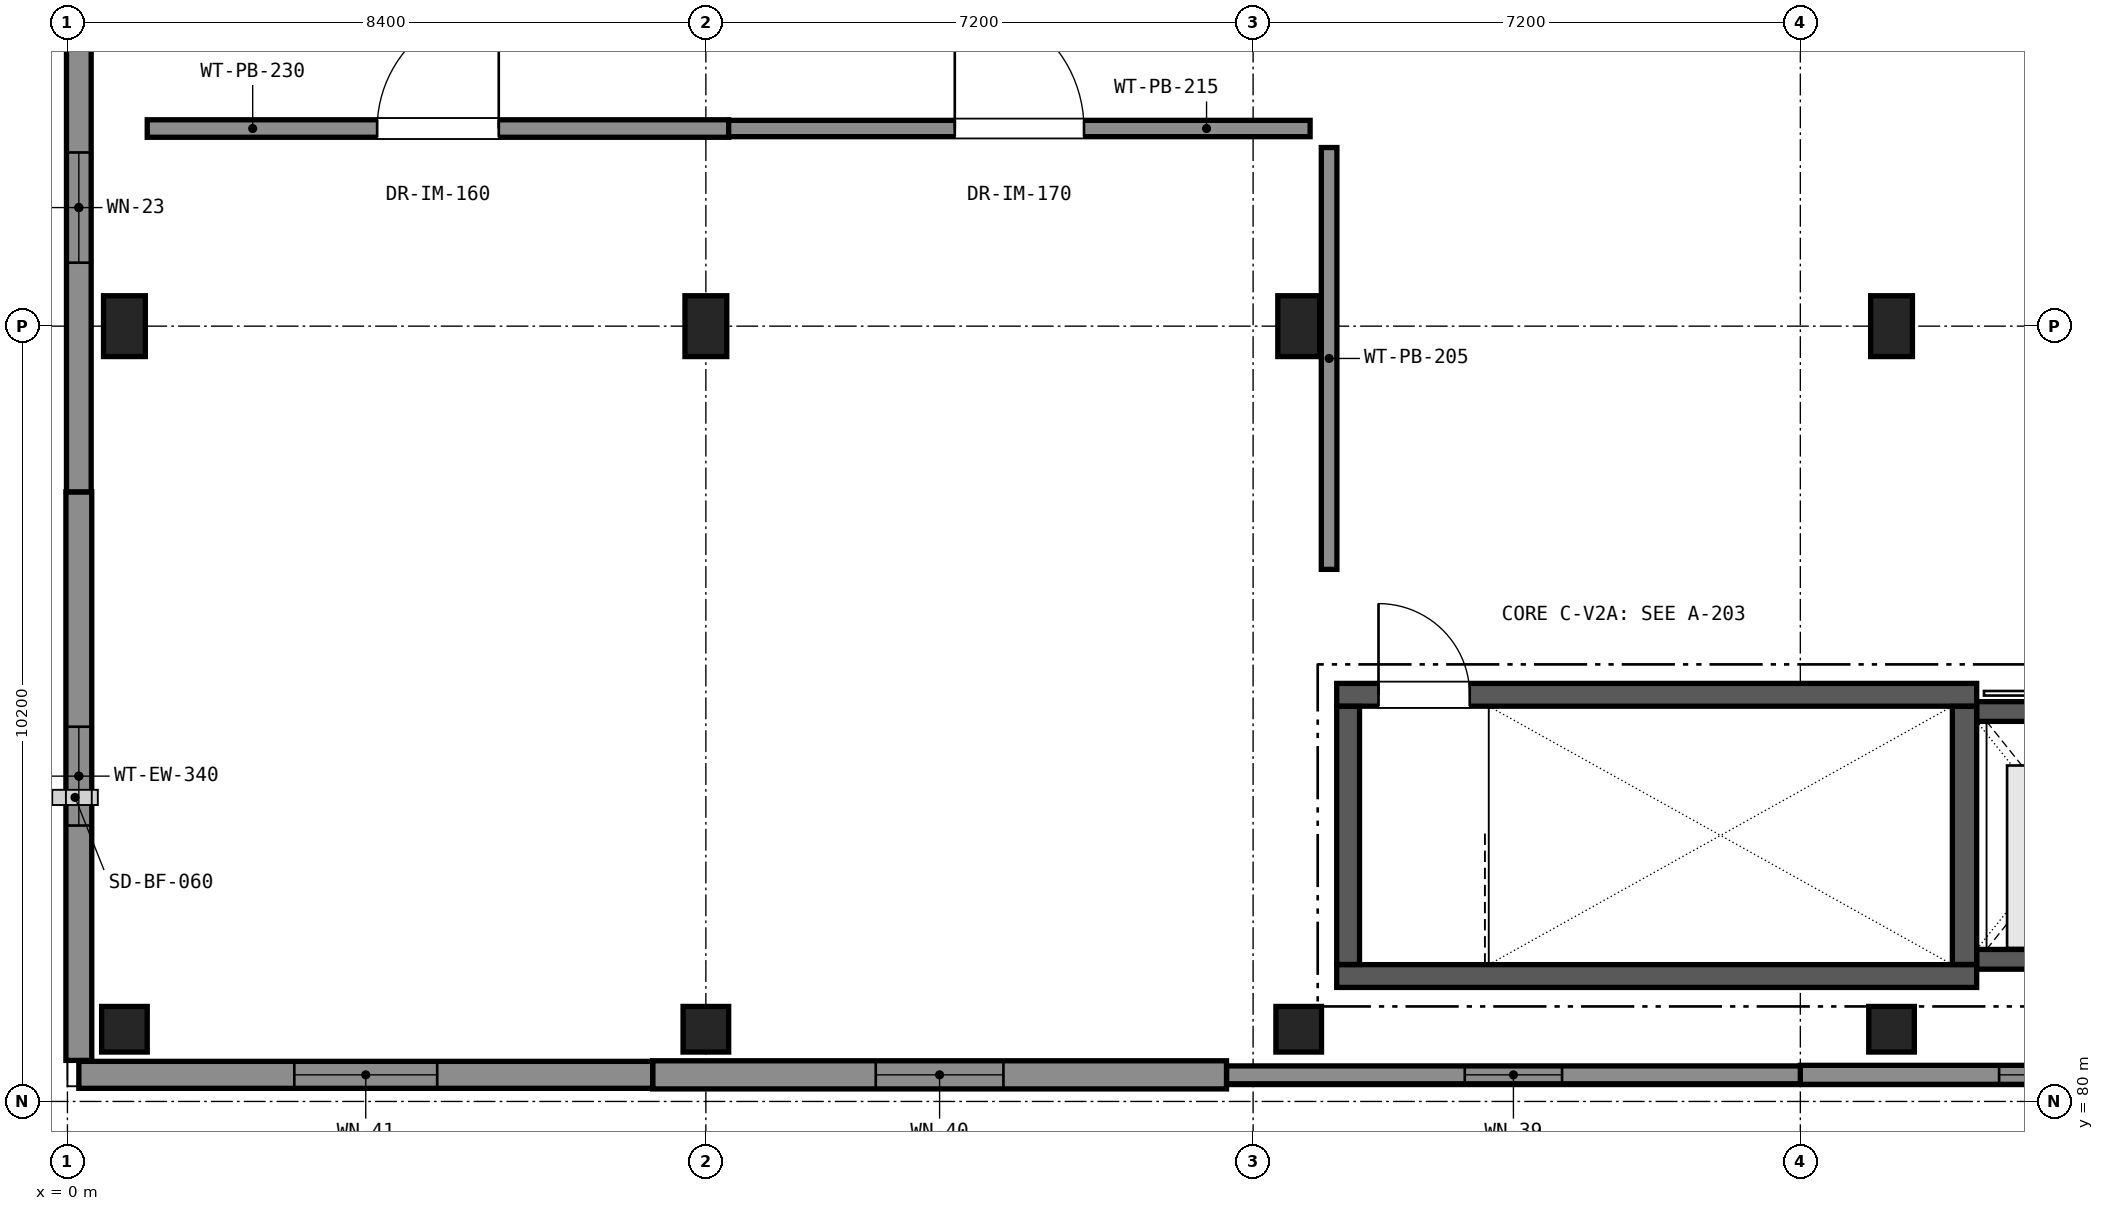
"""IFC4 building model, lengths in metres.
Left out: names, types, materials, properties, quantities, classifications, styles, units other than length and angle.
Written with IfcOpenShell. Run it as: python <this file> out.ifc"""

import sys

from ifc_helpers import new_model, si_unit, direction, frame, frame_2d, origin, origin_2d, place, context, subcontext, project, spatial, rectangle, extrude, element, fill, save


model = new_model("IFC4")
c1 = context("Model", 3, precision=1e-05, world=origin(), true_north=direction((0.0, 1.0)))
c2 = subcontext(c1, "Body", "Model", "MODEL_VIEW")
j1 = project(units=[si_unit("LENGTHUNIT", "METRE"), si_unit("PLANEANGLEUNIT", "RADIAN")], contexts=[c1])
p1 = place(None, origin())
s1 = spatial("IfcSite", under=j1, at=p1, CompositionType="ELEMENT")
p2 = place(p1, origin())
s2 = spatial("IfcBuilding", under=s1, at=p2, CompositionType="ELEMENT")
p3 = place(p2, frame((0.0, 0.0, 9.52)))
s3 = spatial("IfcBuildingStorey", under=s2, at=p3, CompositionType="ELEMENT", Elevation=9.52)
p4 = place(p3, frame((0.75, 80.95, 0.0), z_axis=(0.0, 0.0, 1.0), x_axis=(1.0, 0.0, 0.0)))
e1 = element("IfcColumn", 1, at=p4, inside=s3, PredefinedType="COLUMN", context=c2, shape_type="SweptSolid", body=[
    extrude(rectangle(XDim=0.6, YDim=0.6, at=origin_2d()), origin(), (0.0, 0.0, 1.0), 4.08),
])
p5 = place(p3, frame((0.75, 90.2, 0.0), z_axis=(0.0, 0.0, 1.0), x_axis=(1.0, 0.0, 0.0)))
e2 = element("IfcColumn", 2, at=p5, inside=s3, PredefinedType="COLUMN", context=c2, shape_type="SweptSolid", body=[
    extrude(rectangle(XDim=0.55, YDim=0.8, at=origin_2d()), origin(), (0.0, 0.0, 1.0), 4.08),
])
p6 = place(p3, frame((8.4, 80.95, 0.0), z_axis=(0.0, 0.0, 1.0), x_axis=(1.0, 0.0, 0.0)))
e3 = element("IfcColumn", 3, at=p6, inside=s3, PredefinedType="COLUMN", context=c2, shape_type="SweptSolid", body=[
    extrude(rectangle(XDim=0.6, YDim=0.6, at=origin_2d()), origin(), (0.0, 0.0, 1.0), 4.08),
])
p7 = place(p3, frame((8.4, 90.2, 0.0), z_axis=(0.0, 0.0, 1.0), x_axis=(1.0, 0.0, 0.0)))
e4 = element("IfcColumn", 4, at=p7, inside=s3, PredefinedType="COLUMN", context=c2, shape_type="SweptSolid", body=[
    extrude(rectangle(XDim=0.55, YDim=0.8, at=origin_2d()), origin(), (0.0, 0.0, 1.0), 4.08),
])
p8 = place(p3, frame((16.2, 80.95, 0.0), z_axis=(0.0, 0.0, 1.0), x_axis=(1.0, 0.0, 0.0)))
e5 = element("IfcColumn", 5, at=p8, inside=s3, PredefinedType="COLUMN", context=c2, shape_type="SweptSolid", body=[
    extrude(rectangle(XDim=0.6, YDim=0.6, at=origin_2d()), origin(), (0.0, 0.0, 1.0), 4.08),
])
p9 = place(p3, frame((16.2, 90.2, 0.0), z_axis=(0.0, 0.0, 1.0), x_axis=(1.0, 0.0, 0.0)))
e6 = element("IfcColumn", 6, at=p9, inside=s3, PredefinedType="COLUMN", context=c2, shape_type="SweptSolid", body=[
    extrude(rectangle(XDim=0.55, YDim=0.8, at=origin_2d()), origin(), (0.0, 0.0, 1.0), 4.08),
])
p10 = place(p3, frame((24.0, 80.95, 0.0), z_axis=(0.0, 0.0, 1.0), x_axis=(1.0, 0.0, 0.0)))
e7 = element("IfcColumn", 7, at=p10, inside=s3, PredefinedType="COLUMN", context=c2, shape_type="SweptSolid", body=[
    extrude(rectangle(XDim=0.6, YDim=0.6, at=origin_2d()), origin(), (0.0, 0.0, 1.0), 4.08),
])
p11 = place(p3, frame((24.0, 90.2, 0.0), z_axis=(0.0, 0.0, 1.0), x_axis=(1.0, 0.0, 0.0)))
e8 = element("IfcColumn", 8, at=p11, inside=s3, PredefinedType="COLUMN", context=c2, shape_type="SweptSolid", body=[
    extrude(rectangle(XDim=0.55, YDim=0.8, at=origin_2d()), origin(), (0.0, 0.0, 1.0), 4.08),
])
p12 = place(p3, frame((0.15, 80.54, 0.0), z_axis=(0.0, 0.0, 1.0), x_axis=(0.0, 1.0, 0.0)))
e9 = element("IfcWall", 9, at=p12, inside=s3, PredefinedType="SOLIDWALL", context=c2, shape_type="SweptSolid", body=[
    extrude(rectangle(XDim=7.48, YDim=0.34, at=frame_2d((3.74, 0.0))), origin(), (0.0, 0.0, 1.0), 3.843),
])
p13 = place(p12, frame((3.09, 0.0, 0.9)))
e10 = element("IfcOpeningElement", 10, at=p13, cuts=e9, PredefinedType="OPENING", context=c2, shape_type="SweptSolid", body=[
    extrude(rectangle(XDim=1.3, YDim=2.0, at=frame_2d((0.65, 1.0))), frame((0.0, 0.18, 0.0), z_axis=(0.0, -1.0, 0.0), x_axis=(1.0, 0.0, 0.0)), (0.0, 0.0, 1.0), 0.36),
])
p14 = place(p3, frame((0.15, 88.02, 0.0), z_axis=(0.0, 0.0, 1.0), x_axis=(0.0, 1.0, 0.0)))
e11 = element("IfcWall", 11, at=p14, inside=s3, PredefinedType="SOLIDWALL", context=c2, shape_type="SweptSolid", body=[
    extrude(rectangle(XDim=7.48, YDim=0.325, at=frame_2d((3.74, 0.0))), origin(), (0.0, 0.0, 1.0), 3.843),
])
p15 = place(p14, frame((3.015, 0.0, 0.9)))
e12 = element("IfcOpeningElement", 12, at=p15, cuts=e11, PredefinedType="OPENING", context=c2, shape_type="SweptSolid", body=[
    extrude(rectangle(XDim=1.45, YDim=2.0, at=frame_2d((0.725, 1.0))), frame((0.0, 0.172, 0.0), z_axis=(0.0, -1.0, 0.0), x_axis=(1.0, 0.0, 0.0)), (0.0, 0.0, 1.0), 0.345),
])
p16 = place(p3, frame((30.35, 80.35, 0.0), z_axis=(0.0, 0.0, 1.0), x_axis=(-1.0, 0.0, 0.0)))
e13 = element("IfcWall", 13, at=p16, inside=s3, PredefinedType="SOLIDWALL", context=c2, shape_type="SweptSolid", body=[
    extrude(rectangle(XDim=7.55, YDim=0.25, at=frame_2d((3.775, 0.0))), origin(), (0.0, 0.0, 1.0), 3.843),
])
p17 = place(p16, frame((2.615, 0.0, 0.9)))
e14 = element("IfcOpeningElement", 14, at=p17, cuts=e13, PredefinedType="OPENING", context=c2, shape_type="SweptSolid", body=[
    extrude(rectangle(XDim=2.32, YDim=1.62, at=frame_2d((1.16, 0.81))), frame((0.0, 0.135, 0.0), z_axis=(0.0, -1.0, 0.0), x_axis=(1.0, 0.0, 0.0)), (0.0, 0.0, 1.0), 0.27),
])
p18 = place(p3, frame((22.8, 80.35, 0.0), z_axis=(0.0, 0.0, 1.0), x_axis=(-1.0, 0.0, 0.0)))
e15 = element("IfcWall", 15, at=p18, inside=s3, PredefinedType="SOLIDWALL", context=c2, shape_type="SweptSolid", body=[
    extrude(rectangle(XDim=7.55, YDim=0.235, at=frame_2d((3.775, 0.0))), origin(), (0.0, 0.0, 1.0), 3.843),
])
p19 = place(p18, frame((3.135, 0.0, 0.9)))
e16 = element("IfcOpeningElement", 16, at=p19, cuts=e15, PredefinedType="OPENING", context=c2, shape_type="SweptSolid", body=[
    extrude(rectangle(XDim=1.28, YDim=1.88, at=frame_2d((0.64, 0.94))), frame((0.0, 0.127, 0.0), z_axis=(0.0, -1.0, 0.0), x_axis=(1.0, 0.0, 0.0)), (0.0, 0.0, 1.0), 0.255),
])
p20 = place(p3, frame((15.25, 80.35, 0.0), z_axis=(0.0, 0.0, 1.0), x_axis=(-1.0, 0.0, 0.0)))
e17 = element("IfcWall", 17, at=p20, inside=s3, PredefinedType="SOLIDWALL", context=c2, shape_type="SweptSolid", body=[
    extrude(rectangle(XDim=7.55, YDim=0.37, at=frame_2d((3.775, 0.0))), origin(), (0.0, 0.0, 1.0), 3.843),
])
p21 = place(p20, frame((2.935, 0.0, 0.9)))
e18 = element("IfcOpeningElement", 18, at=p21, cuts=e17, PredefinedType="OPENING", context=c2, shape_type="SweptSolid", body=[
    extrude(rectangle(XDim=1.68, YDim=1.88, at=frame_2d((0.84, 0.94))), frame((0.0, 0.195, 0.0), z_axis=(0.0, -1.0, 0.0), x_axis=(1.0, 0.0, 0.0)), (0.0, 0.0, 1.0), 0.39),
])
p22 = place(p3, frame((7.7, 80.35, 0.0), z_axis=(0.0, 0.0, 1.0), x_axis=(-1.0, 0.0, 0.0)))
e19 = element("IfcWall", 19, at=p22, inside=s3, PredefinedType="SOLIDWALL", context=c2, shape_type="SweptSolid", body=[
    extrude(rectangle(XDim=7.55, YDim=0.355, at=frame_2d((3.775, 0.0))), origin(), (0.0, 0.0, 1.0), 3.843),
])
p23 = place(p22, frame((2.835, 0.0, 0.9)))
e20 = element("IfcOpeningElement", 20, at=p23, cuts=e19, PredefinedType="OPENING", context=c2, shape_type="SweptSolid", body=[
    extrude(rectangle(XDim=1.88, YDim=1.88, at=frame_2d((0.94, 0.94))), frame((0.0, 0.188, 0.0), z_axis=(0.0, -1.0, 0.0), x_axis=(1.0, 0.0, 0.0)), (0.0, 0.0, 1.0), 0.375),
])
p24 = place(p3, frame((16.7, 81.65, 0.0), z_axis=(0.0, 0.0, 1.0), x_axis=(1.0, 0.0, 0.0)))
e21 = element("IfcWall", 21, at=p24, inside=s3, PredefinedType="SHEAR", context=c2, shape_type="SweptSolid", body=[
    extrude(rectangle(XDim=8.42, YDim=0.3, at=frame_2d((4.21, 0.0))), origin(), (0.0, 0.0, 1.0), 3.843),
])
p25 = place(p3, frame((16.7, 85.35, 0.0), z_axis=(0.0, 0.0, 1.0), x_axis=(1.0, 0.0, 0.0)))
e22 = element("IfcWall", 22, at=p25, inside=s3, PredefinedType="SHEAR", context=c2, shape_type="SweptSolid", body=[
    extrude(rectangle(XDim=8.42, YDim=0.3, at=frame_2d((4.21, 0.0))), origin(), (0.0, 0.0, 1.0), 3.843),
])
p26 = place(p25, frame((0.55, 0.0, 0.0)))
e23 = element("IfcOpeningElement", 23, at=p26, cuts=e22, PredefinedType="OPENING", context=c2, shape_type="SweptSolid", body=[
    extrude(rectangle(XDim=1.2, YDim=2.2, at=frame_2d((0.6, 1.1))), frame((0.0, 0.16, 0.0), z_axis=(0.0, -1.0, 0.0), x_axis=(1.0, 0.0, 0.0)), (0.0, 0.0, 1.0), 0.32),
])
p27 = place(p3, frame((16.85, 81.802, 0.0), z_axis=(0.0, 0.0, 1.0), x_axis=(0.0, 1.0, 0.0)))
e24 = element("IfcWall", 24, at=p27, inside=s3, PredefinedType="SHEAR", context=c2, shape_type="SweptSolid", body=[
    extrude(rectangle(XDim=3.396, YDim=0.3, at=frame_2d((1.698, 0.0))), origin(), (0.0, 0.0, 1.0), 3.843),
])
p28 = place(p3, frame((24.96, 81.802, 0.0), z_axis=(0.0, 0.0, 1.0), x_axis=(0.0, 1.0, 0.0)))
e25 = element("IfcWall", 25, at=p28, inside=s3, PredefinedType="SHEAR", context=c2, shape_type="SweptSolid", body=[
    extrude(rectangle(XDim=3.396, YDim=0.32, at=frame_2d((1.698, 0.0))), origin(), (0.0, 0.0, 1.0), 3.843),
])
p29 = place(p3, frame((25.122, 81.87, 0.0), z_axis=(0.0, 0.0, 1.0), x_axis=(1.0, 0.0, 0.0)))
e26 = element("IfcWall", 26, at=p29, inside=s3, PredefinedType="SHEAR", context=c2, shape_type="SweptSolid", body=[
    extrude(rectangle(XDim=2.658, YDim=0.26, at=frame_2d((1.329, 0.0))), origin(), (0.0, 0.0, 1.0), 3.843),
])
p30 = place(p3, frame((25.122, 85.13, 0.0), z_axis=(0.0, 0.0, 1.0), x_axis=(1.0, 0.0, 0.0)))
e27 = element("IfcWall", 27, at=p30, inside=s3, PredefinedType="SHEAR", context=c2, shape_type="SweptSolid", body=[
    extrude(rectangle(XDim=2.658, YDim=0.26, at=frame_2d((1.329, 0.0))), origin(), (0.0, 0.0, 1.0), 3.843),
])
p31 = place(p30, frame((0.679, 0.0, 0.0)))
e28 = element("IfcOpeningElement", 28, at=p31, cuts=e27, PredefinedType="OPENING", context=c2, shape_type="SweptSolid", body=[
    extrude(rectangle(XDim=1.3, YDim=2.2, at=frame_2d((0.65, 1.1))), frame((0.0, 0.14, 0.0), z_axis=(0.0, -1.0, 0.0), x_axis=(1.0, 0.0, 0.0)), (0.0, 0.0, 1.0), 0.28),
])
p32 = place(p3, frame((1.05, 92.8, 0.0), z_axis=(0.0, 0.0, 1.0), x_axis=(1.0, 0.0, 0.0)))
e29 = element("IfcWall", 29, at=p32, inside=s3, PredefinedType="PARTITIONING", context=c2, shape_type="SweptSolid", body=[
    extrude(rectangle(XDim=7.65, YDim=0.23, at=frame_2d((3.825, 0.0))), origin(), (0.0, 0.0, 1.0), 3.043),
])
p33 = place(p32, frame((3.025, 0.0, 0.0)))
e30 = element("IfcOpeningElement", 30, at=p33, cuts=e29, PredefinedType="OPENING", context=c2, shape_type="SweptSolid", body=[
    extrude(rectangle(XDim=1.6, YDim=2.35, at=frame_2d((0.8, 1.175))), frame((0.0, 0.125, 0.0), z_axis=(0.0, -1.0, 0.0), x_axis=(1.0, 0.0, 0.0)), (0.0, 0.0, 1.0), 0.25),
])
p34 = place(p3, frame((8.7, 92.8, 0.0), z_axis=(0.0, 0.0, 1.0), x_axis=(1.0, 0.0, 0.0)))
e31 = element("IfcWall", 31, at=p34, inside=s3, PredefinedType="PARTITIONING", context=c2, shape_type="SweptSolid", body=[
    extrude(rectangle(XDim=7.65, YDim=0.215, at=frame_2d((3.825, 0.0))), origin(), (0.0, 0.0, 1.0), 3.043),
])
p35 = place(p34, frame((2.975, 0.0, 0.0)))
e32 = element("IfcOpeningElement", 32, at=p35, cuts=e31, PredefinedType="OPENING", context=c2, shape_type="SweptSolid", body=[
    extrude(rectangle(XDim=1.7, YDim=2.35, at=frame_2d((0.85, 1.175))), frame((0.0, 0.117, 0.0), z_axis=(0.0, -1.0, 0.0), x_axis=(1.0, 0.0, 0.0)), (0.0, 0.0, 1.0), 0.235),
])
p36 = place(p3, frame((16.6, 92.55, 0.0), z_axis=(0.0, 0.0, 1.0), x_axis=(0.0, -1.0, 0.0)))
e33 = element("IfcWall", 33, at=p36, inside=s3, PredefinedType="PARTITIONING", context=c2, shape_type="SweptSolid", body=[
    extrude(rectangle(XDim=5.55, YDim=0.205, at=frame_2d((2.775, 0.0))), origin(), (0.0, 0.0, 1.0), 3.093),
])
p37 = place(p13, origin())
e34 = element("IfcWindow", 34, at=p37, inside=s3, PartitioningType="SINGLE_PANEL", PredefinedType="WINDOW", context=c2, shape_type="SweptSolid", body=[
    extrude(rectangle(XDim=1.3, YDim=2.0, at=frame_2d((0.65, 1.0))), frame((0.0, 0.03, 0.0), z_axis=(0.0, -1.0, 0.0), x_axis=(1.0, 0.0, 0.0)), (0.0, 0.0, 1.0), 0.06),
])
fill(e10, e34)
p38 = place(p15, origin())
e35 = element("IfcWindow", 35, at=p38, inside=s3, PartitioningType="SINGLE_PANEL", PredefinedType="WINDOW", context=c2, shape_type="SweptSolid", body=[
    extrude(rectangle(XDim=1.45, YDim=2.0, at=frame_2d((0.725, 1.0))), frame((0.0, 0.03, 0.0), z_axis=(0.0, -1.0, 0.0), x_axis=(1.0, 0.0, 0.0)), (0.0, 0.0, 1.0), 0.06),
])
fill(e12, e35)
p39 = place(p17, origin())
e36 = element("IfcWindow", 36, at=p39, inside=s3, PartitioningType="SINGLE_PANEL", PredefinedType="WINDOW", context=c2, shape_type="SweptSolid", body=[
    extrude(rectangle(XDim=2.32, YDim=1.62, at=frame_2d((1.16, 0.81))), frame((0.0, 0.03, 0.0), z_axis=(0.0, -1.0, 0.0), x_axis=(1.0, 0.0, 0.0)), (0.0, 0.0, 1.0), 0.06),
])
fill(e14, e36)
p40 = place(p19, origin())
e37 = element("IfcWindow", 37, at=p40, inside=s3, PartitioningType="SINGLE_PANEL", PredefinedType="WINDOW", context=c2, shape_type="SweptSolid", body=[
    extrude(rectangle(XDim=1.28, YDim=1.88, at=frame_2d((0.64, 0.94))), frame((0.0, 0.03, 0.0), z_axis=(0.0, -1.0, 0.0), x_axis=(1.0, 0.0, 0.0)), (0.0, 0.0, 1.0), 0.06),
])
fill(e16, e37)
p41 = place(p21, origin())
e38 = element("IfcWindow", 38, at=p41, inside=s3, PartitioningType="SINGLE_PANEL", PredefinedType="WINDOW", context=c2, shape_type="SweptSolid", body=[
    extrude(rectangle(XDim=1.68, YDim=1.88, at=frame_2d((0.84, 0.94))), frame((0.0, 0.03, 0.0), z_axis=(0.0, -1.0, 0.0), x_axis=(1.0, 0.0, 0.0)), (0.0, 0.0, 1.0), 0.06),
])
fill(e18, e38)
p42 = place(p23, origin())
e39 = element("IfcWindow", 39, at=p42, inside=s3, PartitioningType="SINGLE_PANEL", PredefinedType="WINDOW", context=c2, shape_type="SweptSolid", body=[
    extrude(rectangle(XDim=1.88, YDim=1.88, at=frame_2d((0.94, 0.94))), frame((0.0, 0.03, 0.0), z_axis=(0.0, -1.0, 0.0), x_axis=(1.0, 0.0, 0.0)), (0.0, 0.0, 1.0), 0.06),
])
fill(e20, e39)
p43 = place(p26, origin())
e40 = element("IfcDoor", 40, at=p43, inside=s3, OperationType="SINGLE_SWING_LEFT", PredefinedType="DOOR", context=c2, shape_type="SweptSolid", body=[
    extrude(rectangle(XDim=1.2, YDim=2.2, at=frame_2d((0.6, 1.1))), frame((0.0, 0.025, 0.0), z_axis=(0.0, -1.0, 0.0), x_axis=(1.0, 0.0, 0.0)), (0.0, 0.0, 1.0), 0.05),
])
fill(e23, e40)
p44 = place(p33, origin())
e41 = element("IfcDoor", 41, at=p44, inside=s3, OperationType="SINGLE_SWING_RIGHT", PredefinedType="DOOR", context=c2, shape_type="SweptSolid", body=[
    extrude(rectangle(XDim=1.6, YDim=2.35, at=frame_2d((0.8, 1.175))), frame((0.0, 0.025, 0.0), z_axis=(0.0, -1.0, 0.0), x_axis=(1.0, 0.0, 0.0)), (0.0, 0.0, 1.0), 0.05),
])
fill(e30, e41)
p45 = place(p35, origin())
e42 = element("IfcDoor", 42, at=p45, inside=s3, OperationType="SINGLE_SWING_LEFT", PredefinedType="DOOR", context=c2, shape_type="SweptSolid", body=[
    extrude(rectangle(XDim=1.7, YDim=2.35, at=frame_2d((0.85, 1.175))), frame((0.0, 0.025, 0.0), z_axis=(0.0, -1.0, 0.0), x_axis=(1.0, 0.0, 0.0)), (0.0, 0.0, 1.0), 0.05),
])
fill(e32, e42)
save(model, sys.argv[1])
